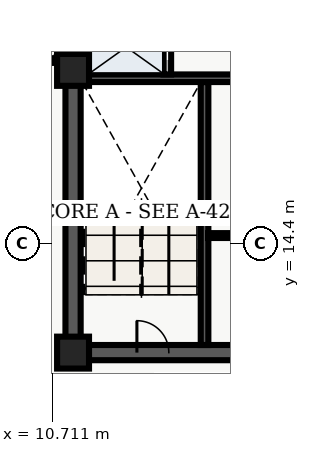
"""IFC4 building model, lengths in metres.
Left out: names, types, materials, properties, quantities, classifications, styles, units other than length and angle.
Written with IfcOpenShell. Run it as: python <this file> out.ifc"""

import sys

from ifc_helpers import new_model, entity, si_unit, converted_unit, direction, frame, origin_with_axes, origin_2d_with_axis, place, context, subcontext, project, spatial, polyline, rectangle, outline, extrude, element, fill, save


model = new_model("IFC4")
c1 = context("Model", 3, precision=1e-05, world=origin_with_axes(), true_north=direction((0.0, 1.0)))
c2 = subcontext(c1, "Body", "Model", "MODEL_VIEW")
j1 = project(units=[si_unit("LENGTHUNIT", "METRE"), converted_unit("PLANEANGLEUNIT", "DEGREE", entity("IfcPlaneAngleMeasure", 0.017), si_unit("PLANEANGLEUNIT", "RADIAN"), dimensions=[0, 0, 0, 0, 0, 0, 0])], contexts=[c1])
p1 = place(None, origin_with_axes())
s1 = spatial("IfcSite", under=j1, at=p1, CompositionType="ELEMENT")
p2 = place(p1, origin_with_axes())
s2 = spatial("IfcBuilding", under=s1, at=p2, CompositionType="ELEMENT")
p3 = place(p2, frame((0.0, 0.0, 160.2), z_axis=(0.0, 0.0, 1.0), x_axis=(1.0, 0.0, 0.0)))
s3 = spatial("IfcBuildingStorey", under=s2, at=p3, CompositionType="ELEMENT", Elevation=160.2)
p4 = place(p3, frame((11.4, 10.8, 0.0), z_axis=(0.0, 0.0, 1.0), x_axis=(0.0, 1.0, 0.0)))
e1 = element("IfcWall", 1, at=p4, inside=s3, PredefinedType="SHEAR", context=c2, shape_type="SweptSolid", body=[
    extrude(outline(polyline([(0.0, -0.25), (27.0, -0.25), (27.0, 0.25), (0.0, 0.25), (0.0, -0.25)])), origin_with_axes(), (0.0, 0.0, 1.0), 3.66),
])
p5 = place(p3, frame((11.4, 10.8, 0.0), z_axis=(0.0, 0.0, 1.0), x_axis=(1.0, 0.0, 0.0)))
e2 = element("IfcWall", 2, at=p5, inside=s3, PredefinedType="SHEAR", context=c2, shape_type="SweptSolid", body=[
    extrude(outline(polyline([(0.0, -0.25), (7.2, -0.25), (7.2, 0.25), (0.0, 0.25), (0.0, -0.25)])), origin_with_axes(), (0.0, 0.0, 1.0), 3.66),
])
p6 = place(p5, frame((2.625, 0.0, 0.0), z_axis=(0.0, 0.0, 1.0), x_axis=(1.0, 0.0, 0.0)))
e3 = element("IfcOpeningElement", 3, at=p6, cuts=e2, PredefinedType="OPENING", context=c2, shape_type="SweptSolid", body=[
    extrude(rectangle(XDim=1.05, YDim=0.52, at=origin_2d_with_axis()), origin_with_axes(), (0.0, 0.0, 1.0), 2.15),
])
p7 = place(p3, frame((15.725, 11.05, 0.0), z_axis=(0.0, 0.0, 1.0), x_axis=(0.0, 1.0, 0.0)))
e4 = element("IfcWall", 4, at=p7, inside=s3, PredefinedType="SHEAR", context=c2, shape_type="SweptSolid", body=[
    extrude(outline(polyline([(0.0, -0.125), (8.65, -0.125), (8.65, 0.125), (0.0, 0.125), (0.0, -0.125)])), origin_with_axes(), (0.0, 0.0, 1.0), 3.66),
])
p8 = place(p3, frame((11.65, 19.825, 0.0), z_axis=(0.0, 0.0, 1.0), x_axis=(1.0, 0.0, 0.0)))
e5 = element("IfcWall", 5, at=p8, inside=s3, PredefinedType="SHEAR", context=c2, shape_type="SweptSolid", body=[
    extrude(outline(polyline([(0.0, -0.125), (6.7, -0.125), (6.7, 0.125), (0.0, 0.125), (0.0, -0.125)])), origin_with_axes(), (0.0, 0.0, 1.0), 3.66),
])
p9 = place(p3, frame((14.5, 19.95, 0.0), z_axis=(0.0, 0.0, 1.0), x_axis=(0.0, 1.0, 0.0)))
e6 = element("IfcWall", 6, at=p9, inside=s3, PredefinedType="SOLIDWALL", context=c2, shape_type="SweptSolid", body=[
    extrude(outline(polyline([(0.0, -0.125), (6.25, -0.125), (6.25, 0.125), (0.0, 0.125), (0.0, -0.125)])), origin_with_axes(), (0.0, 0.0, 1.0), 2.7),
])
p10 = place(p9, frame((1.025, 0.0, 0.0), z_axis=(0.0, 0.0, 1.0), x_axis=(1.0, 0.0, 0.0)))
e7 = element("IfcOpeningElement", 7, at=p10, cuts=e6, PredefinedType="OPENING", context=c2, shape_type="SweptSolid", body=[
    extrude(rectangle(XDim=1.1, YDim=0.27, at=origin_2d_with_axis()), origin_with_axes(), (0.0, 0.0, 1.0), 2.15),
])
p11 = place(p9, frame((2.975, 0.0, 0.0), z_axis=(0.0, 0.0, 1.0), x_axis=(1.0, 0.0, 0.0)))
e8 = element("IfcOpeningElement", 8, at=p11, cuts=e6, PredefinedType="OPENING", context=c2, shape_type="SweptSolid", body=[
    extrude(rectangle(XDim=1.1, YDim=0.27, at=origin_2d_with_axis()), origin_with_axes(), (0.0, 0.0, 1.0), 2.15),
])
p12 = place(p9, frame((5.425, 0.0, 0.0), z_axis=(0.0, 0.0, 1.0), x_axis=(1.0, 0.0, 0.0)))
e9 = element("IfcOpeningElement", 9, at=p12, cuts=e6, PredefinedType="OPENING", context=c2, shape_type="SweptSolid", body=[
    extrude(rectangle(XDim=1.2, YDim=0.27, at=origin_2d_with_axis()), origin_with_axes(), (0.0, 0.0, 1.0), 2.15),
])
for number, where, z_axis, x_axis in (
    (10, (11.4, 10.8, 0.0), (0.0, 0.0, 1.0), (1.0, 0.0, 0.0)),
    (11, (11.4, 20.1, 0.0), (0.0, 0.0, 1.0), (1.0, 0.0, 0.0)),
):
    element("IfcColumn", number, at=place(p3, frame(where, z_axis=z_axis, x_axis=x_axis)), inside=s3, PredefinedType="COLUMN", context=c2, shape_type="SweptSolid", body=[
        extrude(rectangle(XDim=1.05, YDim=1.05, at=origin_2d_with_axis()), origin_with_axes(), (0.0, 0.0, 1.0), 3.9),
    ])
p13 = place(p3, frame((15.84, 14.65, 0.0), z_axis=(0.0, 0.0, 1.0), x_axis=(1.0, 0.0, 0.0)))
e12 = element("IfcWall", 12, at=p13, inside=s3, PredefinedType="PARTITIONING", context=c2, shape_type="SweptSolid", body=[
    extrude(outline(polyline([(0.0, -0.08), (2.46, -0.08), (2.46, 0.08), (0.0, 0.08), (0.0, -0.08)])), origin_with_axes(), (0.0, 0.0, 1.0), 2.7),
])
p14 = place(p3, frame((9.52, 20.4, 0.0), z_axis=(0.0, 0.0, 1.0), x_axis=(1.0, 0.0, 0.0)))
e13 = element("IfcWall", 13, at=p14, inside=s3, PredefinedType="PARTITIONING", context=c2, shape_type="SweptSolid", body=[
    extrude(outline(polyline([(0.0, -0.07), (1.58, -0.07), (1.58, 0.07), (0.0, 0.07), (0.0, -0.07)])), origin_with_axes(), (0.0, 0.0, 1.0), 2.7),
])
p15 = place(p14, frame((0.59, 0.0, 0.0), z_axis=(0.0, 0.0, 1.0), x_axis=(1.0, 0.0, 0.0)))
e14 = element("IfcOpeningElement", 14, at=p15, cuts=e13, PredefinedType="OPENING", context=c2, shape_type="SweptSolid", body=[
    extrude(rectangle(XDim=0.9, YDim=0.16, at=origin_2d_with_axis()), origin_with_axes(), (0.0, 0.0, 1.0), 2.15),
])
p16 = place(p9, frame((1.025, 0.0, 0.0), z_axis=(0.0, 0.0, 1.0), x_axis=(1.0, 0.0, 0.0)))
e15 = element("IfcDoor", 15, at=p16, inside=s3, OperationType="SLIDING_TO_LEFT", PredefinedType="DOOR", context=c2, shape_type="SweptSolid", body=[
    extrude(rectangle(XDim=1.1, YDim=0.09, at=origin_2d_with_axis()), origin_with_axes(), (0.0, 0.0, 1.0), 2.15),
])
fill(e7, e15)
p17 = place(p5, frame((2.625, 0.0, 0.0), z_axis=(0.0, 0.0, 1.0), x_axis=(1.0, 0.0, 0.0)))
e16 = element("IfcDoor", 16, at=p17, inside=s3, OperationType="SINGLE_SWING_LEFT", PredefinedType="DOOR", context=c2, shape_type="SweptSolid", body=[
    extrude(rectangle(XDim=1.05, YDim=0.09, at=origin_2d_with_axis()), origin_with_axes(), (0.0, 0.0, 1.0), 2.15),
])
fill(e3, e16)
save(model, sys.argv[1])
